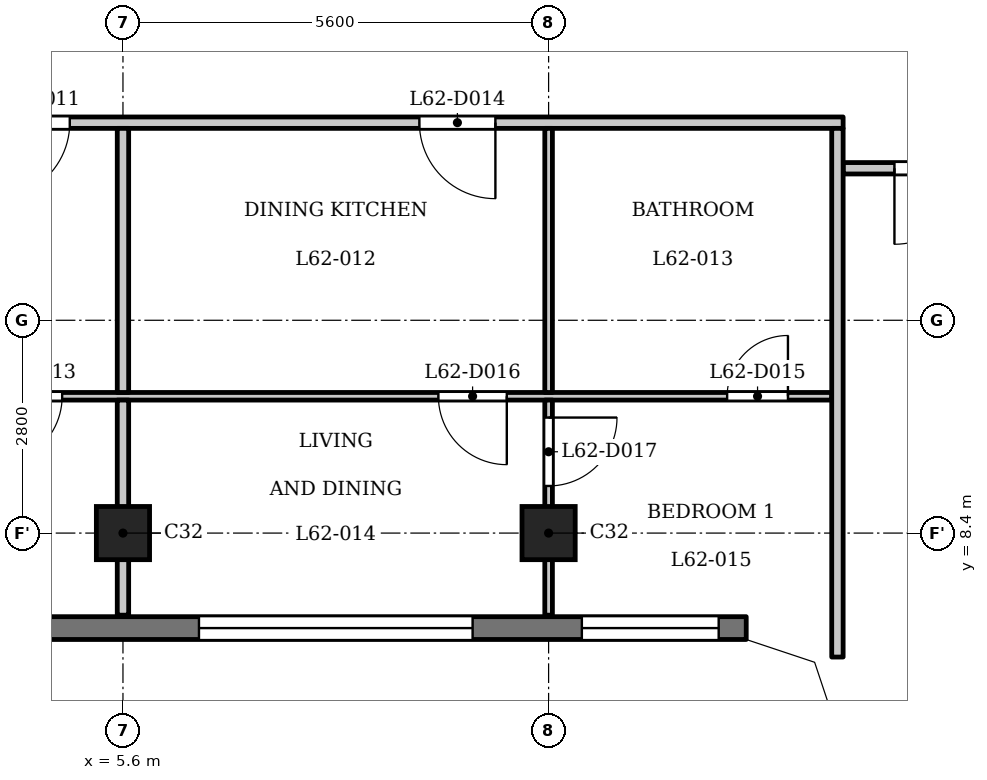
"""IFC4 building model, lengths in metres.
Left out: names, types, materials, properties, quantities, classifications, styles, units other than length and angle.
Written with IfcOpenShell. Run it as: python <this file> out.ifc"""

import sys

from ifc_helpers import new_model, si_unit, direction, frame, frame_2d, origin, origin_2d, place, context, subcontext, project, spatial, polyline, rectangle, outline, extrude, element, fill, save


model = new_model("IFC4")
c1 = context("Model", 3, precision=1e-05, world=origin(), true_north=direction((0.0, 1.0)))
c2 = subcontext(c1, "Body", "Model", "MODEL_VIEW")
j1 = project(units=[si_unit("LENGTHUNIT", "METRE"), si_unit("PLANEANGLEUNIT", "RADIAN")], contexts=[c1])
p1 = place(None, origin())
s1 = spatial("IfcSite", under=j1, at=p1, CompositionType="ELEMENT")
p2 = place(p1, origin())
s2 = spatial("IfcBuilding", under=s1, at=p2, CompositionType="ELEMENT")
p3 = place(p2, frame((0.0, 0.0, 241.7)))
s3 = spatial("IfcBuildingStorey", under=s2, at=p3, CompositionType="ELEMENT", Elevation=241.7)
for number, where, z_axis, x_axis in (
    (1, (5.6, 8.4, 0.0), (0.0, 0.0, 1.0), (1.0, 0.0, 0.0)),
    (2, (11.2, 8.4, 0.0), (0.0, 0.0, 1.0), (1.0, 0.0, 0.0)),
):
    element("IfcColumn", number, at=place(p3, frame(where, z_axis=z_axis, x_axis=x_axis)), inside=s3, PredefinedType="COLUMN", context=c2, shape_type="SweptSolid", body=[
        extrude(rectangle(XDim=0.7, YDim=0.7, at=origin_2d()), origin(), (0.0, 0.0, 1.0), 3.5),
    ])
p4 = place(p3, frame((-13.8, 7.15, 0.0), z_axis=(0.0, 0.0, 1.0), x_axis=(1.0, 0.0, 0.0)))
e3 = element("IfcWall", 3, at=p4, inside=s3, PredefinedType="SOLIDWALL", context=c2, shape_type="SweptSolid", body=[
    extrude(rectangle(XDim=27.6, YDim=0.3, at=frame_2d((13.8, 0.0))), origin(), (0.0, 0.0, 1.0), 3.2),
])
p5 = place(p4, frame((0.363, 0.0, 0.9)))
e4 = element("IfcOpeningElement", 4, at=p5, cuts=e3, PredefinedType="OPENING", context=c2, shape_type="SweptSolid", body=[
    extrude(rectangle(XDim=1.8, YDim=1.25, at=frame_2d((0.9, 0.625))), frame((0.0, 0.16, 0.0), z_axis=(0.0, -1.0, 0.0), x_axis=(1.0, 0.0, 0.0)), (0.0, 0.0, 1.0), 0.32),
])
p6 = place(p4, frame((3.6, 0.0, 1.2)))
e5 = element("IfcOpeningElement", 5, at=p6, cuts=e3, PredefinedType="OPENING", context=c2, shape_type="SweptSolid", body=[
    extrude(rectangle(XDim=3.6, YDim=0.95, at=frame_2d((1.8, 0.475))), frame((0.0, 0.16, 0.0), z_axis=(0.0, -1.0, 0.0), x_axis=(1.0, 0.0, 0.0)), (0.0, 0.0, 1.0), 0.32),
])
p7 = place(p4, frame((9.2, 0.0, 1.2)))
e6 = element("IfcOpeningElement", 6, at=p7, cuts=e3, PredefinedType="OPENING", context=c2, shape_type="SweptSolid", body=[
    extrude(rectangle(XDim=3.6, YDim=0.95, at=frame_2d((1.8, 0.475))), frame((0.0, 0.16, 0.0), z_axis=(0.0, -1.0, 0.0), x_axis=(1.0, 0.0, 0.0)), (0.0, 0.0, 1.0), 0.32),
])
p8 = place(p4, frame((14.8, 0.0, 1.2)))
e7 = element("IfcOpeningElement", 7, at=p8, cuts=e3, PredefinedType="OPENING", context=c2, shape_type="SweptSolid", body=[
    extrude(rectangle(XDim=3.6, YDim=0.95, at=frame_2d((1.8, 0.475))), frame((0.0, 0.16, 0.0), z_axis=(0.0, -1.0, 0.0), x_axis=(1.0, 0.0, 0.0)), (0.0, 0.0, 1.0), 0.32),
])
p9 = place(p4, frame((20.4, 0.0, 1.2)))
e8 = element("IfcOpeningElement", 8, at=p9, cuts=e3, PredefinedType="OPENING", context=c2, shape_type="SweptSolid", body=[
    extrude(rectangle(XDim=3.6, YDim=0.95, at=frame_2d((1.8, 0.475))), frame((0.0, 0.16, 0.0), z_axis=(0.0, -1.0, 0.0), x_axis=(1.0, 0.0, 0.0)), (0.0, 0.0, 1.0), 0.32),
])
p10 = place(p4, frame((25.438, 0.0, 0.9)))
e9 = element("IfcOpeningElement", 9, at=p10, cuts=e3, PredefinedType="OPENING", context=c2, shape_type="SweptSolid", body=[
    extrude(rectangle(XDim=1.8, YDim=1.25, at=frame_2d((0.9, 0.625))), frame((0.0, 0.16, 0.0), z_axis=(0.0, -1.0, 0.0), x_axis=(1.0, 0.0, 0.0)), (0.0, 0.0, 1.0), 0.32),
])
p11 = place(p3, frame((-14.925, 10.2, 0.0), z_axis=(0.0, 0.0, 1.0), x_axis=(1.0, 0.0, 0.0)))
e10 = element("IfcWall", 10, at=p11, inside=s3, PredefinedType="PARTITIONING", context=c2, shape_type="SweptSolid", body=[
    extrude(rectangle(XDim=29.85, YDim=0.1, at=frame_2d((14.925, 0.0))), origin(), (0.0, 0.0, 1.0), 3.2),
])
p12 = place(p11, frame((13.475, 0.0, 0.0)))
e11 = element("IfcOpeningElement", 11, at=p12, cuts=e10, PredefinedType="OPENING", context=c2, shape_type="SweptSolid", body=[
    extrude(rectangle(XDim=0.9, YDim=2.1, at=frame_2d((0.45, 1.05))), frame((0.0, 0.06, 0.0), z_axis=(0.0, -1.0, 0.0), x_axis=(1.0, 0.0, 0.0)), (0.0, 0.0, 1.0), 0.12),
])
p13 = place(p11, frame((4.375, 0.0, 0.0)))
e12 = element("IfcOpeningElement", 12, at=p13, cuts=e10, PredefinedType="OPENING", context=c2, shape_type="SweptSolid", body=[
    extrude(rectangle(XDim=0.9, YDim=2.1, at=frame_2d((0.45, 1.05))), frame((0.0, 0.06, 0.0), z_axis=(0.0, -1.0, 0.0), x_axis=(1.0, 0.0, 0.0)), (0.0, 0.0, 1.0), 0.12),
])
p14 = place(p11, frame((15.475, 0.0, 0.0)))
e13 = element("IfcOpeningElement", 13, at=p14, cuts=e10, PredefinedType="OPENING", context=c2, shape_type="SweptSolid", body=[
    extrude(rectangle(XDim=0.8, YDim=2.1, at=frame_2d((0.4, 1.05))), frame((0.0, 0.06, 0.0), z_axis=(0.0, -1.0, 0.0), x_axis=(1.0, 0.0, 0.0)), (0.0, 0.0, 1.0), 0.12),
])
p15 = place(p11, frame((18.825, 0.0, 0.0)))
e14 = element("IfcOpeningElement", 14, at=p15, cuts=e10, PredefinedType="OPENING", context=c2, shape_type="SweptSolid", body=[
    extrude(rectangle(XDim=0.9, YDim=2.1, at=frame_2d((0.45, 1.05))), frame((0.0, 0.06, 0.0), z_axis=(0.0, -1.0, 0.0), x_axis=(1.0, 0.0, 0.0)), (0.0, 0.0, 1.0), 0.12),
])
p16 = place(p11, frame((28.474, 0.0, 0.0)))
e15 = element("IfcOpeningElement", 15, at=p16, cuts=e10, PredefinedType="OPENING", context=c2, shape_type="SweptSolid", body=[
    extrude(rectangle(XDim=0.8, YDim=2.1, at=frame_2d((0.4, 1.05))), frame((0.0, 0.06, 0.0), z_axis=(0.0, -1.0, 0.0), x_axis=(1.0, 0.0, 0.0)), (0.0, 0.0, 1.0), 0.12),
])
p17 = place(p11, frame((24.675, 0.0, 0.0)))
e16 = element("IfcOpeningElement", 16, at=p17, cuts=e10, PredefinedType="OPENING", context=c2, shape_type="SweptSolid", body=[
    extrude(rectangle(XDim=0.9, YDim=2.1, at=frame_2d((0.45, 1.05))), frame((0.0, 0.06, 0.0), z_axis=(0.0, -1.0, 0.0), x_axis=(1.0, 0.0, 0.0)), (0.0, 0.0, 1.0), 0.12),
])
p18 = place(p3, frame((15.075, 13.2, 0.0), z_axis=(0.0, 0.0, 1.0), x_axis=(1.0, 0.0, 0.0)))
e17 = element("IfcWall", 17, at=p18, inside=s3, PredefinedType="PARTITIONING", context=c2, shape_type="SweptSolid", body=[
    extrude(rectangle(XDim=2.325, YDim=0.15, at=frame_2d((1.163, 0.0))), origin(), (0.0, 0.0, 1.0), 3.2),
])
p19 = place(p18, frame((0.675, 0.0, 0.0)))
e18 = element("IfcOpeningElement", 18, at=p19, cuts=e17, PredefinedType="OPENING", context=c2, shape_type="SweptSolid", body=[
    extrude(rectangle(XDim=1.0, YDim=2.1, at=frame_2d((0.5, 1.05))), frame((0.0, 0.085, 0.0), z_axis=(0.0, -1.0, 0.0), x_axis=(1.0, 0.0, 0.0)), (0.0, 0.0, 1.0), 0.17),
])
p20 = place(p3, frame((-15.075, 13.8, 0.0), z_axis=(0.0, 0.0, 1.0), x_axis=(1.0, 0.0, 0.0)))
e19 = element("IfcWall", 19, at=p20, inside=s3, PredefinedType="PARTITIONING", context=c2, shape_type="SweptSolid", body=[
    extrude(rectangle(XDim=30.15, YDim=0.15, at=frame_2d((15.075, 0.0))), origin(), (0.0, 0.0, 1.0), 3.2),
])
p21 = place(p20, frame((10.125, 0.0, 0.0)))
e20 = element("IfcOpeningElement", 20, at=p21, cuts=e19, PredefinedType="OPENING", context=c2, shape_type="SweptSolid", body=[
    extrude(rectangle(XDim=1.0, YDim=2.1, at=frame_2d((0.5, 1.05))), frame((0.0, 0.085, 0.0), z_axis=(0.0, -1.0, 0.0), x_axis=(1.0, 0.0, 0.0)), (0.0, 0.0, 1.0), 0.17),
])
p22 = place(p20, frame((18.975, 0.0, 0.0)))
e21 = element("IfcOpeningElement", 21, at=p22, cuts=e19, PredefinedType="OPENING", context=c2, shape_type="SweptSolid", body=[
    extrude(rectangle(XDim=1.0, YDim=2.1, at=frame_2d((0.5, 1.05))), frame((0.0, 0.085, 0.0), z_axis=(0.0, -1.0, 0.0), x_axis=(1.0, 0.0, 0.0)), (0.0, 0.0, 1.0), 0.17),
])
p23 = place(p20, frame((24.575, 0.0, 0.0)))
e22 = element("IfcOpeningElement", 22, at=p23, cuts=e19, PredefinedType="OPENING", context=c2, shape_type="SweptSolid", body=[
    extrude(rectangle(XDim=1.0, YDim=2.1, at=frame_2d((0.5, 1.05))), frame((0.0, 0.085, 0.0), z_axis=(0.0, -1.0, 0.0), x_axis=(1.0, 0.0, 0.0)), (0.0, 0.0, 1.0), 0.17),
])
p24 = place(p3, frame((5.6, 7.32, 0.0), z_axis=(0.0, 0.0, 1.0), x_axis=(0.0, 1.0, 0.0)))
e23 = element("IfcWall", 23, at=p24, inside=s3, PredefinedType="PARTITIONING", context=c2, shape_type="SweptSolid", body=[
    extrude(rectangle(XDim=2.83, YDim=0.15, at=frame_2d((1.415, 0.0))), origin(), (0.0, 0.0, 1.0), 3.2),
])
p25 = place(p3, frame((5.6, 10.25, 0.0), z_axis=(0.0, 0.0, 1.0), x_axis=(0.0, 1.0, 0.0)))
e24 = element("IfcWall", 24, at=p25, inside=s3, PredefinedType="PARTITIONING", context=c2, shape_type="SweptSolid", body=[
    extrude(rectangle(XDim=3.475, YDim=0.15, at=frame_2d((1.738, 0.0))), origin(), (0.0, 0.0, 1.0), 3.2),
])
p26 = place(p3, frame((11.2, 7.32, 0.0), z_axis=(0.0, 0.0, 1.0), x_axis=(0.0, 1.0, 0.0)))
e25 = element("IfcWall", 25, at=p26, inside=s3, PredefinedType="PARTITIONING", context=c2, shape_type="SweptSolid", body=[
    extrude(rectangle(XDim=2.83, YDim=0.1, at=frame_2d((1.415, 0.0))), origin(), (0.0, 0.0, 1.0), 3.2),
])
p27 = place(p26, frame((1.7, 0.0, 0.0)))
e26 = element("IfcOpeningElement", 26, at=p27, cuts=e25, PredefinedType="OPENING", context=c2, shape_type="SweptSolid", body=[
    extrude(rectangle(XDim=0.9, YDim=2.1, at=frame_2d((0.45, 1.05))), frame((0.0, 0.06, 0.0), z_axis=(0.0, -1.0, 0.0), x_axis=(1.0, 0.0, 0.0)), (0.0, 0.0, 1.0), 0.12),
])
p28 = place(p3, frame((11.2, 10.25, 0.0), z_axis=(0.0, 0.0, 1.0), x_axis=(0.0, 1.0, 0.0)))
e27 = element("IfcWall", 27, at=p28, inside=s3, PredefinedType="PARTITIONING", context=c2, shape_type="SweptSolid", body=[
    extrude(rectangle(XDim=3.475, YDim=0.1, at=frame_2d((1.738, 0.0))), origin(), (0.0, 0.0, 1.0), 3.2),
])
p29 = place(p3, frame((15.0, 6.769, 0.0), z_axis=(0.0, 0.0, 1.0), x_axis=(0.0, 1.0, 0.0)))
e28 = element("IfcWall", 28, at=p29, inside=s3, PredefinedType="PARTITIONING", context=c2, shape_type="SweptSolid", body=[
    extrude(rectangle(XDim=6.956, YDim=0.15, at=frame_2d((3.478, 0.0))), origin(), (0.0, 0.0, 1.0), 3.2),
])
p30 = place(p3, origin())
e29 = element("IfcWall", 29, at=p30, inside=s3, PredefinedType="SOLIDWALL", context=c2, shape_type="SweptSolid", body=[
    extrude(outline(polyline([(14.937, 6.937), (13.849, 7.3), (13.8, 7.3), (13.8, 7.0), (14.7, 6.7), (15.0, 5.8), (15.3, 5.8), (15.3, 5.849), (14.937, 6.937)])), origin(), (0.0, 0.0, 1.0), 3.2),
])
p31 = place(p19, origin())
e30 = element("IfcDoor", 30, at=p31, inside=s3, OperationType="SINGLE_SWING_LEFT", PredefinedType="DOOR", context=c2, shape_type="SweptSolid", body=[
    extrude(rectangle(XDim=1.0, YDim=2.1, at=frame_2d((0.5, 1.05))), frame((0.0, 0.025, 0.0), z_axis=(0.0, -1.0, 0.0), x_axis=(1.0, 0.0, 0.0)), (0.0, 0.0, 1.0), 0.05),
])
fill(e18, e30)
p32 = place(p22, origin())
e31 = element("IfcDoor", 31, at=p32, inside=s3, OperationType="SINGLE_SWING_LEFT", PredefinedType="DOOR", context=c2, shape_type="SweptSolid", body=[
    extrude(rectangle(XDim=1.0, YDim=2.1, at=frame_2d((0.5, 1.05))), frame((0.0, 0.025, 0.0), z_axis=(0.0, -1.0, 0.0), x_axis=(1.0, 0.0, 0.0)), (0.0, 0.0, 1.0), 0.05),
])
fill(e21, e31)
p33 = place(p15, origin())
e32 = element("IfcDoor", 32, at=p33, inside=s3, OperationType="SINGLE_SWING_LEFT", PredefinedType="DOOR", context=c2, shape_type="SweptSolid", body=[
    extrude(rectangle(XDim=0.9, YDim=2.1, at=frame_2d((0.45, 1.05))), frame((0.0, 0.025, 0.0), z_axis=(0.0, -1.0, 0.0), x_axis=(1.0, 0.0, 0.0)), (0.0, 0.0, 1.0), 0.05),
])
fill(e14, e32)
p34 = place(p23, origin())
e33 = element("IfcDoor", 33, at=p34, inside=s3, OperationType="SINGLE_SWING_RIGHT", PredefinedType="DOOR", context=c2, shape_type="SweptSolid", body=[
    extrude(rectangle(XDim=1.0, YDim=2.1, at=frame_2d((0.5, 1.05))), frame((0.0, 0.025, 0.0), z_axis=(0.0, -1.0, 0.0), x_axis=(1.0, 0.0, 0.0)), (0.0, 0.0, 1.0), 0.05),
])
fill(e22, e33)
p35 = place(p16, origin())
e34 = element("IfcDoor", 34, at=p35, inside=s3, OperationType="SINGLE_SWING_LEFT", PredefinedType="DOOR", context=c2, shape_type="SweptSolid", body=[
    extrude(rectangle(XDim=0.8, YDim=2.1, at=frame_2d((0.4, 1.05))), frame((0.0, 0.025, 0.0), z_axis=(0.0, -1.0, 0.0), x_axis=(1.0, 0.0, 0.0)), (0.0, 0.0, 1.0), 0.05),
])
fill(e15, e34)
p36 = place(p17, origin())
e35 = element("IfcDoor", 35, at=p36, inside=s3, OperationType="SINGLE_SWING_RIGHT", PredefinedType="DOOR", context=c2, shape_type="SweptSolid", body=[
    extrude(rectangle(XDim=0.9, YDim=2.1, at=frame_2d((0.45, 1.05))), frame((0.0, 0.025, 0.0), z_axis=(0.0, -1.0, 0.0), x_axis=(1.0, 0.0, 0.0)), (0.0, 0.0, 1.0), 0.05),
])
fill(e16, e35)
p37 = place(p27, origin())
e36 = element("IfcDoor", 36, at=p37, inside=s3, OperationType="SINGLE_SWING_RIGHT", PredefinedType="DOOR", context=c2, shape_type="SweptSolid", body=[
    extrude(rectangle(XDim=0.9, YDim=2.1, at=frame_2d((0.45, 1.05))), frame((0.0, 0.025, 0.0), z_axis=(0.0, -1.0, 0.0), x_axis=(1.0, 0.0, 0.0)), (0.0, 0.0, 1.0), 0.05),
])
fill(e26, e36)
p38 = place(p9, origin())
e37 = element("IfcWindow", 37, at=p38, inside=s3, PartitioningType="SINGLE_PANEL", PredefinedType="WINDOW", context=c2, shape_type="SweptSolid", body=[
    extrude(rectangle(XDim=3.6, YDim=0.95, at=frame_2d((1.8, 0.475))), frame((0.0, 0.03, 0.0), z_axis=(0.0, -1.0, 0.0), x_axis=(1.0, 0.0, 0.0)), (0.0, 0.0, 1.0), 0.06),
])
fill(e8, e37)
p39 = place(p10, origin())
e38 = element("IfcWindow", 38, at=p39, inside=s3, PartitioningType="SINGLE_PANEL", PredefinedType="WINDOW", context=c2, shape_type="SweptSolid", body=[
    extrude(rectangle(XDim=1.8, YDim=1.25, at=frame_2d((0.9, 0.625))), frame((0.0, 0.03, 0.0), z_axis=(0.0, -1.0, 0.0), x_axis=(1.0, 0.0, 0.0)), (0.0, 0.0, 1.0), 0.06),
])
fill(e9, e38)
save(model, sys.argv[1])
